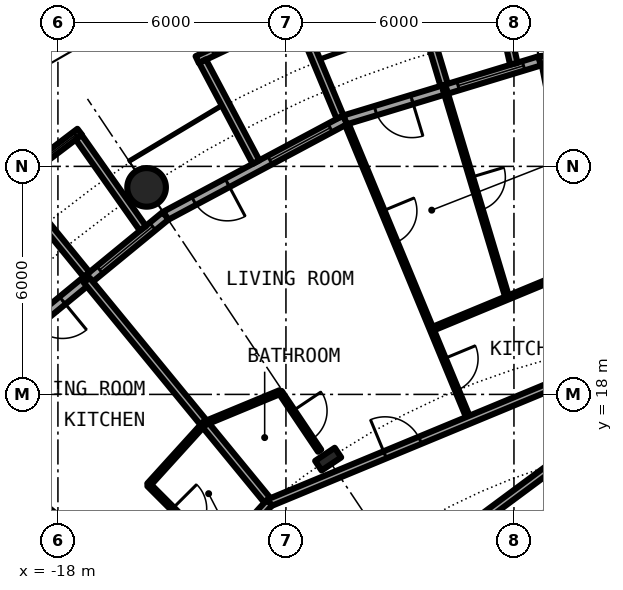
"""IFC4 building model, lengths in metres.
Left out: names, types, materials, properties, quantities, classifications, styles, units other than length and angle.
Written with IfcOpenShell. Run it as: python <this file> out.ifc"""

import sys

from ifc_helpers import new_model, si_unit, direction, frame, frame_2d, origin, origin_2d, place, context, subcontext, project, spatial, rectangle, circle, hollow_circle, i_section, extrude, element, fill, save


model = new_model("IFC4")
c1 = context("Model", 3, precision=1e-05, world=origin(), true_north=direction((0.0, 1.0)))
c2 = subcontext(c1, "Body", "Model", "MODEL_VIEW")
j1 = project(units=[si_unit("LENGTHUNIT", "METRE"), si_unit("PLANEANGLEUNIT", "RADIAN")], contexts=[c1])
p1 = place(None, origin())
s1 = spatial("IfcSite", under=j1, at=p1, CompositionType="ELEMENT")
p2 = place(p1, origin())
s2 = spatial("IfcBuilding", under=s1, at=p2, CompositionType="ELEMENT")
p3 = place(p2, frame((0.0, 0.0, 47.2)))
s3 = spatial("IfcBuildingStorey", under=s2, at=p3, CompositionType="ELEMENT", Elevation=47.2)
p4 = place(p3, frame((-15.667, 23.448, 0.0), z_axis=(0.0, 0.0, 1.0), x_axis=(1.0, 0.0, 0.0)))
e1 = element("IfcColumn", 1, at=p4, inside=s3, PredefinedType="COLUMN", context=c2, shape_type="SweptSolid", body=[
    extrude(hollow_circle(Radius=0.508, WallThickness=0.05, at=origin_2d()), origin(), (0.0, 0.0, 1.0), 3.05),
])
p5 = place(p3, frame((-10.889, 16.297, 0.0), z_axis=(0.0, 0.0, 1.0), x_axis=(-0.55557023302, 0.831469612303, 0.0)))
e2 = element("IfcColumn", 2, at=p5, inside=s3, PredefinedType="COLUMN", context=c2, shape_type="SweptSolid", body=[
    extrude(i_section(OverallWidth=0.305, OverallDepth=0.62, WebThickness=0.021, FlangeThickness=0.04, FilletRadius=0.027, at=origin_2d()), origin(), (0.0, 0.0, 1.0), 3.05),
])
p6 = place(p3, frame((0.0, 27.3, 0.0), z_axis=(0.0, 0.0, 1.0), x_axis=(-0.995173996315, -0.098126026407, 0.0)))
e3 = element("IfcWall", 3, at=p6, inside=s3, PredefinedType="SOLIDWALL", context=c2, shape_type="SweptSolid", body=[
    extrude(rectangle(XDim=5.352, YDim=0.25, at=frame_2d((2.676, 0.0))), origin(), (0.0, 0.0, 1.0), 2.7),
])
p7 = place(p6, frame((0.441, 0.0, 0.3)))
e4 = element("IfcOpeningElement", 4, at=p7, cuts=e3, PredefinedType="OPENING", context=c2, shape_type="SweptSolid", body=[
    extrude(rectangle(XDim=1.8, YDim=2.1, at=frame_2d((0.9, 1.05))), frame((0.0, 0.135, 0.0), z_axis=(0.0, -1.0, 0.0), x_axis=(1.0, 0.0, 0.0)), (0.0, 0.0, 1.0), 0.27),
])
p8 = place(p6, frame((3.51, 0.0, 0.0)))
e5 = element("IfcOpeningElement", 5, at=p8, cuts=e3, PredefinedType="OPENING", context=c2, shape_type="SweptSolid", body=[
    extrude(rectangle(XDim=1.0, YDim=2.2, at=frame_2d((0.5, 1.1))), frame((0.0, 0.135, 0.0), z_axis=(0.0, -1.0, 0.0), x_axis=(1.0, 0.0, 0.0)), (0.0, 0.0, 1.0), 0.27),
])
p9 = place(p3, frame((-5.326, 26.775, 0.0), z_axis=(0.0, 0.0, 1.0), x_axis=(-0.956965678721, -0.290201119486, 0.0)))
e6 = element("IfcWall", 6, at=p9, inside=s3, PredefinedType="SOLIDWALL", context=c2, shape_type="SweptSolid", body=[
    extrude(rectangle(XDim=5.351, YDim=0.25, at=frame_2d((2.676, 0.0))), origin(), (0.0, 0.0, 1.0), 2.7),
])
p10 = place(p9, frame((0.441, 0.0, 0.3)))
e7 = element("IfcOpeningElement", 7, at=p10, cuts=e6, PredefinedType="OPENING", context=c2, shape_type="SweptSolid", body=[
    extrude(rectangle(XDim=1.8, YDim=2.1, at=frame_2d((0.9, 1.05))), frame((0.0, 0.135, 0.0), z_axis=(0.0, -1.0, 0.0), x_axis=(1.0, 0.0, 0.0)), (0.0, 0.0, 1.0), 0.27),
])
p11 = place(p9, frame((3.51, 0.0, 0.0)))
e8 = element("IfcOpeningElement", 8, at=p11, cuts=e6, PredefinedType="OPENING", context=c2, shape_type="SweptSolid", body=[
    extrude(rectangle(XDim=1.0, YDim=2.2, at=frame_2d((0.5, 1.1))), frame((0.0, 0.135, 0.0), z_axis=(0.0, -1.0, 0.0), x_axis=(1.0, 0.0, 0.0)), (0.0, 0.0, 1.0), 0.27),
])
p12 = place(p3, frame((-6.004, 26.7, -0.03), z_axis=(0.0, 0.0, 1.0), x_axis=(-0.219609259383, 0.975587911566, 0.0)))
e9 = element("IfcWall", 9, at=p12, inside=s3, PredefinedType="SOLIDWALL", context=c2, shape_type="SweptSolid", body=[
    extrude(rectangle(XDim=2.933, YDim=0.2, at=frame_2d((1.466, 0.0))), origin(), (0.0, 0.0, 1.0), 2.73),
])
p13 = place(p3, frame((-7.837, 26.144, -0.03), z_axis=(0.0, 0.0, 1.0), x_axis=(-0.287064767992, 0.957911174889, 0.0)))
e10 = element("IfcWall", 10, at=p13, inside=s3, PredefinedType="SOLIDWALL", context=c2, shape_type="SweptSolid", body=[
    extrude(rectangle(XDim=3.006, YDim=0.2, at=frame_2d((1.503, 0.0))), origin(), (0.0, 0.0, 1.0), 2.73),
])
p14 = place(p3, frame((-10.447, 25.222, 0.0), z_axis=(0.0, 0.0, 1.0), x_axis=(-0.881915646801, -0.471407246368, 0.0)))
e11 = element("IfcWall", 11, at=p14, inside=s3, PredefinedType="SOLIDWALL", context=c2, shape_type="SweptSolid", body=[
    extrude(rectangle(XDim=5.352, YDim=0.25, at=frame_2d((2.676, 0.0))), origin(), (0.0, 0.0, 1.0), 2.7),
])
p15 = place(p14, frame((0.441, 0.0, 0.3)))
e12 = element("IfcOpeningElement", 12, at=p15, cuts=e11, PredefinedType="OPENING", context=c2, shape_type="SweptSolid", body=[
    extrude(rectangle(XDim=1.8, YDim=2.1, at=frame_2d((0.9, 1.05))), frame((0.0, 0.135, 0.0), z_axis=(0.0, -1.0, 0.0), x_axis=(1.0, 0.0, 0.0)), (0.0, 0.0, 1.0), 0.27),
])
p16 = place(p14, frame((3.51, 0.0, 0.0)))
e13 = element("IfcOpeningElement", 13, at=p16, cuts=e11, PredefinedType="OPENING", context=c2, shape_type="SweptSolid", body=[
    extrude(rectangle(XDim=1.0, YDim=2.2, at=frame_2d((0.5, 1.1))), frame((0.0, 0.135, 0.0), z_axis=(0.0, -1.0, 0.0), x_axis=(1.0, 0.0, 0.0)), (0.0, 0.0, 1.0), 0.27),
])
p17 = place(p3, frame((-11.629, 28.088, -0.03), z_axis=(0.0, 0.0, 1.0), x_axis=(-0.904000060331, -0.427532327342, 0.0)))
e14 = element("IfcWall", 14, at=p17, inside=s3, PredefinedType="SOLIDWALL", context=c2, shape_type="SweptSolid", body=[
    extrude(rectangle(XDim=2.993, YDim=0.2, at=frame_2d((1.497, 0.0))), origin(), (0.0, 0.0, 1.0), 2.73),
])
p18 = place(p17, frame((0.457, 0.0, 0.33)))
e15 = element("IfcOpeningElement", 15, at=p18, cuts=e14, PredefinedType="OPENING", context=c2, shape_type="SweptSolid", body=[
    extrude(circle(Radius=1.04, at=frame_2d((1.04, 1.04))), frame((0.0, 0.11, 0.0), z_axis=(0.0, -1.0, 0.0), x_axis=(1.0, 0.0, 0.0)), (0.0, 0.0, 1.0), 0.22),
])
p19 = place(p3, frame((-10.575, 25.295, -0.03), z_axis=(0.0, 0.0, 1.0), x_axis=(-0.385697364644, 0.922625353492, 0.0)))
e16 = element("IfcWall", 16, at=p19, inside=s3, PredefinedType="SOLIDWALL", context=c2, shape_type="SweptSolid", body=[
    extrude(rectangle(XDim=2.883, YDim=0.2, at=frame_2d((1.442, 0.0))), origin(), (0.0, 0.0, 1.0), 2.73),
])
p20 = place(p3, frame((-12.787, 24.113, -0.03), z_axis=(0.0, 0.0, 1.0), x_axis=(-0.468365282436, 0.883534924159, 0.0)))
e17 = element("IfcWall", 17, at=p20, inside=s3, PredefinedType="SOLIDWALL", context=c2, shape_type="SweptSolid", body=[
    extrude(rectangle(XDim=3.006, YDim=0.2, at=frame_2d((1.503, 0.0))), origin(), (0.0, 0.0, 1.0), 2.73),
])
p21 = place(p3, frame((-15.167, 22.699, 0.0), z_axis=(0.0, 0.0, 1.0), x_axis=(-0.773019449054, -0.634382322723, 0.0)))
e18 = element("IfcWall", 18, at=p21, inside=s3, PredefinedType="SOLIDWALL", context=c2, shape_type="SweptSolid", body=[
    extrude(rectangle(XDim=5.352, YDim=0.25, at=frame_2d((2.676, 0.0))), origin(), (0.0, 0.0, 1.0), 2.7),
])
p22 = place(p21, frame((0.441, 0.0, 0.3)))
e19 = element("IfcOpeningElement", 19, at=p22, cuts=e18, PredefinedType="OPENING", context=c2, shape_type="SweptSolid", body=[
    extrude(rectangle(XDim=1.8, YDim=2.1, at=frame_2d((0.9, 1.05))), frame((0.0, 0.135, 0.0), z_axis=(0.0, -1.0, 0.0), x_axis=(1.0, 0.0, 0.0)), (0.0, 0.0, 1.0), 0.27),
])
p23 = place(p21, frame((3.51, 0.0, 0.0)))
e20 = element("IfcOpeningElement", 20, at=p23, cuts=e18, PredefinedType="OPENING", context=c2, shape_type="SweptSolid", body=[
    extrude(rectangle(XDim=1.0, YDim=2.2, at=frame_2d((0.5, 1.1))), frame((0.0, 0.135, 0.0), z_axis=(0.0, -1.0, 0.0), x_axis=(1.0, 0.0, 0.0)), (0.0, 0.0, 1.0), 0.27),
])
p24 = place(p3, frame((-17.427, 24.909, -0.03), z_axis=(0.0, 0.0, 1.0), x_axis=(-0.796842165306, -0.60418752353, 0.0)))
e21 = element("IfcWall", 21, at=p24, inside=s3, PredefinedType="SOLIDWALL", context=c2, shape_type="SweptSolid", body=[
    extrude(rectangle(XDim=2.337, YDim=0.2, at=frame_2d((1.168, 0.0))), origin(), (0.0, 0.0, 1.0), 2.73),
])
p25 = place(p24, frame((0.128, 0.0, 0.33)))
e22 = element("IfcOpeningElement", 22, at=p25, cuts=e21, PredefinedType="OPENING", context=c2, shape_type="SweptSolid", body=[
    extrude(circle(Radius=1.04, at=frame_2d((1.04, 1.04))), frame((0.0, 0.11, 0.0), z_axis=(0.0, -1.0, 0.0), x_axis=(1.0, 0.0, 0.0)), (0.0, 0.0, 1.0), 0.22),
])
p26 = place(p3, frame((-15.765, 22.37, -0.03), z_axis=(0.0, 0.0, 1.0), x_axis=(-0.576274612209, 0.817256123454, 0.0)))
e23 = element("IfcWall", 23, at=p26, inside=s3, PredefinedType="SOLIDWALL", context=c2, shape_type="SweptSolid", body=[
    extrude(rectangle(XDim=2.933, YDim=0.2, at=frame_2d((1.466, 0.0))), origin(), (0.0, 0.0, 1.0), 2.73),
])
p27 = place(p3, frame((-17.246, 21.155, -0.03), z_axis=(0.0, 0.0, 1.0), x_axis=(-0.631741648902, 0.775179004516, 0.0)))
e24 = element("IfcWall", 24, at=p27, inside=s3, PredefinedType="SOLIDWALL", context=c2, shape_type="SweptSolid", body=[
    extrude(rectangle(XDim=3.006, YDim=0.2, at=frame_2d((1.503, 0.0))), origin(), (0.0, 0.0, 1.0), 2.73),
])
p28 = place(p3, frame((-10.398, 25.107, 0.0), z_axis=(0.0, 0.0, 1.0), x_axis=(0.382458509789, -0.923972666419, 0.0)))
e25 = element("IfcWall", 25, at=p28, inside=s3, PredefinedType="PARTITIONING", context=c2, shape_type="SweptSolid", body=[
    extrude(rectangle(XDim=8.419, YDim=0.1, at=frame_2d((4.209, 0.0))), origin(), (0.0, 0.0, 1.0), 2.7),
])
p29 = place(p28, frame((6.677, 0.0, 0.0)))
e26 = element("IfcOpeningElement", 26, at=p29, cuts=e25, PredefinedType="OPENING", context=c2, shape_type="SweptSolid", body=[
    extrude(rectangle(XDim=0.9, YDim=2.3, at=frame_2d((0.45, 1.15))), frame((0.0, 0.06, 0.0), z_axis=(0.0, -1.0, 0.0), x_axis=(1.0, 0.0, 0.0)), (0.0, 0.0, 1.0), 0.12),
])
p30 = place(p28, frame((2.468, 0.0, 0.0)))
e27 = element("IfcOpeningElement", 27, at=p30, cuts=e25, PredefinedType="OPENING", context=c2, shape_type="SweptSolid", body=[
    extrude(rectangle(XDim=0.9, YDim=2.3, at=frame_2d((0.45, 1.15))), frame((0.0, 0.06, 0.0), z_axis=(0.0, -1.0, 0.0), x_axis=(1.0, 0.0, 0.0)), (0.0, 0.0, 1.0), 0.12),
])
p31 = place(p3, frame((-22.596, 15.097, 0.0), z_axis=(0.0, 0.0, 1.0), x_axis=(0.831507055747, -0.555514190857, 0.0)))
e28 = element("IfcWall", 28, at=p31, inside=s3, PredefinedType="PARTITIONING", context=c2, shape_type="SweptSolid", body=[
    extrude(rectangle(XDim=7.265, YDim=0.2, at=frame_2d((3.633, 0.0))), origin(), (0.0, 0.0, 1.0), 2.7),
])
p32 = place(p3, frame((-21.014, 17.231, 0.0), z_axis=(0.0, 0.0, 1.0), x_axis=(0.773219330916, -0.634138680651, 0.0)))
e29 = element("IfcWall", 29, at=p32, inside=s3, PredefinedType="PARTITIONING", context=c2, shape_type="SweptSolid", body=[
    extrude(rectangle(XDim=5.089, YDim=0.1, at=frame_2d((2.544, 0.0))), origin(), (0.0, 0.0, 1.0), 2.7),
])
p33 = place(p32, frame((2.095, 0.0, 0.0)))
e30 = element("IfcOpeningElement", 30, at=p33, cuts=e29, PredefinedType="OPENING", context=c2, shape_type="SweptSolid", body=[
    extrude(rectangle(XDim=0.9, YDim=2.3, at=frame_2d((0.45, 1.15))), frame((0.0, 0.06, 0.0), z_axis=(0.0, -1.0, 0.0), x_axis=(1.0, 0.0, 0.0)), (0.0, 0.0, 1.0), 0.12),
])
p34 = place(p3, frame((-17.243, 21.005, 0.0), z_axis=(0.0, 0.0, 1.0), x_axis=(0.63447412651, -0.772944100689, 0.0)))
e31 = element("IfcWall", 31, at=p34, inside=s3, PredefinedType="PARTITIONING", context=c2, shape_type="SweptSolid", body=[
    extrude(rectangle(XDim=7.576, YDim=0.2, at=frame_2d((3.788, 0.0))), origin(), (0.0, 0.0, 1.0), 2.7),
])
p35 = place(p3, frame((-15.612, 15.622, 0.0), z_axis=(0.0, 0.0, 1.0), x_axis=(0.706741540154, -0.707471833659, 0.0)))
e32 = element("IfcWall", 32, at=p35, inside=s3, PredefinedType="PARTITIONING", context=c2, shape_type="SweptSolid", body=[
    extrude(rectangle(XDim=2.674, YDim=0.1, at=frame_2d((1.337, 0.0))), origin(), (0.0, 0.0, 1.0), 2.7),
])
p36 = place(p35, frame((0.887, 0.0, 0.0)))
e33 = element("IfcOpeningElement", 33, at=p36, cuts=e32, PredefinedType="OPENING", context=c2, shape_type="SweptSolid", body=[
    extrude(rectangle(XDim=0.9, YDim=2.3, at=frame_2d((0.45, 1.15))), frame((0.0, 0.06, 0.0), z_axis=(0.0, -1.0, 0.0), x_axis=(1.0, 0.0, 0.0)), (0.0, 0.0, 1.0), 0.12),
])
p37 = place(p3, frame((-12.153, 18.064, 0.0), z_axis=(0.0, 0.0, 1.0), x_axis=(0.558084773293, -0.829783939239, 0.0)))
e34 = element("IfcWall", 34, at=p37, inside=s3, PredefinedType="PARTITIONING", context=c2, shape_type="SweptSolid", body=[
    extrude(rectangle(XDim=1.862, YDim=0.1, at=frame_2d((0.931, 0.0))), origin(), (0.0, 0.0, 1.0), 2.7),
])
p38 = place(p37, frame((0.6, 0.0, 0.0)))
e35 = element("IfcOpeningElement", 35, at=p38, cuts=e34, PredefinedType="OPENING", context=c2, shape_type="SweptSolid", body=[
    extrude(rectangle(XDim=0.9, YDim=2.3, at=frame_2d((0.45, 1.15))), frame((0.0, 0.06, 0.0), z_axis=(0.0, -1.0, 0.0), x_axis=(1.0, 0.0, 0.0)), (0.0, 0.0, 1.0), 0.12),
])
p39 = place(p3, frame((-7.821, 26.025, 0.0), z_axis=(0.0, 0.0, 1.0), x_axis=(0.287793773423, -0.957692405723, 0.0)))
e36 = element("IfcWall", 36, at=p39, inside=s3, PredefinedType="PARTITIONING", context=c2, shape_type="SweptSolid", body=[
    extrude(rectangle(XDim=5.726, YDim=0.1, at=frame_2d((2.863, 0.0))), origin(), (0.0, 0.0, 1.0), 2.7),
])
p40 = place(p39, frame((2.413, 0.0, 0.0)))
e37 = element("IfcOpeningElement", 37, at=p40, cuts=e36, PredefinedType="OPENING", context=c2, shape_type="SweptSolid", body=[
    extrude(rectangle(XDim=0.9, YDim=2.3, at=frame_2d((0.45, 1.15))), frame((0.0, 0.06, 0.0), z_axis=(0.0, -1.0, 0.0), x_axis=(1.0, 0.0, 0.0)), (0.0, 0.0, 1.0), 0.12),
])
p41 = place(p3, frame((-5.217, 26.67, 0.0), z_axis=(0.0, 0.0, 1.0), x_axis=(0.192109041462, -0.981373586453, 0.0)))
e38 = element("IfcWall", 38, at=p41, inside=s3, PredefinedType="PARTITIONING", context=c2, shape_type="SweptSolid", body=[
    extrude(rectangle(XDim=5.404, YDim=0.1, at=frame_2d((2.702, 0.0))), origin(), (0.0, 0.0, 1.0), 2.7),
])
p42 = place(p41, frame((2.252, 0.0, 0.0)))
e39 = element("IfcOpeningElement", 39, at=p42, cuts=e38, PredefinedType="OPENING", context=c2, shape_type="SweptSolid", body=[
    extrude(rectangle(XDim=0.9, YDim=2.3, at=frame_2d((0.45, 1.15))), frame((0.0, 0.06, 0.0), z_axis=(0.0, -1.0, 0.0), x_axis=(1.0, 0.0, 0.0)), (0.0, 0.0, 1.0), 0.12),
])
p43 = place(p3, frame((-14.037, 9.4, 0.0), z_axis=(0.0, 0.0, 1.0), x_axis=(0.803202106898, 0.595706618626, 0.0)))
e40 = element("IfcWall", 40, at=p43, inside=s3, PredefinedType="PARTITIONING", context=c2, shape_type="SweptSolid", body=[
    extrude(rectangle(XDim=11.368, YDim=0.2, at=frame_2d((5.684, 0.0))), origin(), (0.0, 0.0, 1.0), 2.7),
])
p44 = place(p43, frame((5.988, 0.0, 0.0)))
e41 = element("IfcOpeningElement", 41, at=p44, cuts=e40, PredefinedType="OPENING", context=c2, shape_type="SweptSolid", body=[
    extrude(rectangle(XDim=1.0, YDim=2.3, at=frame_2d((0.5, 1.15))), frame((0.0, 0.11, 0.0), z_axis=(0.0, -1.0, 0.0), x_axis=(1.0, 0.0, 0.0)), (0.0, 0.0, 1.0), 0.22),
])
p45 = place(p3, frame((-12.435, 15.15, 0.0), z_axis=(0.0, 0.0, 1.0), x_axis=(0.923845560554, 0.38276543763, 0.0)))
e42 = element("IfcWall", 42, at=p45, inside=s3, PredefinedType="PARTITIONING", context=c2, shape_type="SweptSolid", body=[
    extrude(rectangle(XDim=11.381, YDim=0.2, at=frame_2d((5.69, 0.0))), origin(), (0.0, 0.0, 1.0), 2.7),
])
p46 = place(p45, frame((3.293, 0.0, 0.0)))
e43 = element("IfcOpeningElement", 43, at=p46, cuts=e42, PredefinedType="OPENING", context=c2, shape_type="SweptSolid", body=[
    extrude(rectangle(XDim=1.0, YDim=2.3, at=frame_2d((0.5, 1.15))), frame((0.0, 0.11, 0.0), z_axis=(0.0, -1.0, 0.0), x_axis=(1.0, 0.0, 0.0)), (0.0, 0.0, 1.0), 0.22),
])
p47 = place(p3, frame((-16.193, 11.003, 0.0), z_axis=(0.0, 0.0, 1.0), x_axis=(0.671514934772, 0.740991020444, 0.0)))
e44 = element("IfcWall", 44, at=p47, inside=s3, PredefinedType="PARTITIONING", context=c2, shape_type="SweptSolid", body=[
    extrude(rectangle(XDim=5.598, YDim=0.2, at=frame_2d((2.799, 0.0))), origin(), (0.0, 0.0, 1.0), 2.38),
])
p48 = place(p47, frame((1.293, 0.0, 0.0)))
e45 = element("IfcOpeningElement", 45, at=p48, cuts=e44, PredefinedType="OPENING", context=c2, shape_type="SweptSolid", body=[
    extrude(rectangle(XDim=1.0, YDim=2.3, at=frame_2d((0.5, 1.15))), frame((0.0, 0.11, 0.0), z_axis=(0.0, -1.0, 0.0), x_axis=(1.0, 0.0, 0.0)), (0.0, 0.0, 1.0), 0.22),
])
p49 = place(p3, frame((-14.149, 17.236, 0.0), z_axis=(0.0, 0.0, 1.0), x_axis=(0.923874819588, 0.382694810171, 0.0)))
e46 = element("IfcWall", 46, at=p49, inside=s3, PredefinedType="PARTITIONING", context=c2, shape_type="SweptSolid", body=[
    extrude(rectangle(XDim=2.158, YDim=0.1, at=frame_2d((1.079, 0.0))), origin(), (0.0, 0.0, 1.0), 2.7),
])
p50 = place(p3, frame((-8.166, 19.715, 0.0), z_axis=(0.0, 0.0, 1.0), x_axis=(0.923844914631, 0.382766996632, 0.0)))
e47 = element("IfcWall", 47, at=p50, inside=s3, PredefinedType="PARTITIONING", context=c2, shape_type="SweptSolid", body=[
    extrude(rectangle(XDim=6.474, YDim=0.1, at=frame_2d((3.237, 0.0))), origin(), (0.0, 0.0, 1.0), 2.7),
])
p51 = place(p3, frame((-15.613, 15.621, 0.0), z_axis=(0.0, 0.0, 1.0), x_axis=(0.67169789574, 0.740825172937, 0.0)))
e48 = element("IfcWall", 48, at=p51, inside=s3, PredefinedType="PARTITIONING", context=c2, shape_type="SweptSolid", body=[
    extrude(rectangle(XDim=2.183, YDim=0.1, at=frame_2d((1.091, 0.0))), origin(), (0.0, 0.0, 1.0), 2.7),
])
p52 = place(p10, origin())
e49 = element("IfcWindow", 49, at=p52, inside=s3, PartitioningType="SINGLE_PANEL", PredefinedType="WINDOW", context=c2, shape_type="SweptSolid", body=[
    extrude(rectangle(XDim=1.8, YDim=2.1, at=frame_2d((0.9, 1.05))), frame((0.0, 0.03, 0.0), z_axis=(0.0, -1.0, 0.0), x_axis=(1.0, 0.0, 0.0)), (0.0, 0.0, 1.0), 0.06),
])
fill(e7, e49)
p53 = place(p11, origin())
e50 = element("IfcDoor", 50, at=p53, inside=s3, OperationType="SINGLE_SWING_LEFT", PredefinedType="DOOR", context=c2, shape_type="SweptSolid", body=[
    extrude(rectangle(XDim=1.0, YDim=2.2, at=frame_2d((0.5, 1.1))), frame((0.0, 0.025, 0.0), z_axis=(0.0, -1.0, 0.0), x_axis=(1.0, 0.0, 0.0)), (0.0, 0.0, 1.0), 0.05),
])
fill(e8, e50)
p54 = place(p15, origin())
e51 = element("IfcWindow", 51, at=p54, inside=s3, PartitioningType="SINGLE_PANEL", PredefinedType="WINDOW", context=c2, shape_type="SweptSolid", body=[
    extrude(rectangle(XDim=1.8, YDim=2.1, at=frame_2d((0.9, 1.05))), frame((0.0, 0.03, 0.0), z_axis=(0.0, -1.0, 0.0), x_axis=(1.0, 0.0, 0.0)), (0.0, 0.0, 1.0), 0.06),
])
fill(e12, e51)
p55 = place(p18, origin())
e52 = element("IfcWindow", 52, at=p55, inside=s3, PartitioningType="SINGLE_PANEL", PredefinedType="WINDOW", context=c2, shape_type="SweptSolid", body=[
    extrude(circle(Radius=1.04, at=frame_2d((1.04, 1.04))), frame((0.0, 0.03, 0.0), z_axis=(0.0, -1.0, 0.0), x_axis=(1.0, 0.0, 0.0)), (0.0, 0.0, 1.0), 0.06),
])
fill(e15, e52)
p56 = place(p16, origin())
e53 = element("IfcDoor", 53, at=p56, inside=s3, OperationType="SINGLE_SWING_LEFT", PredefinedType="DOOR", context=c2, shape_type="SweptSolid", body=[
    extrude(rectangle(XDim=1.0, YDim=2.2, at=frame_2d((0.5, 1.1))), frame((0.0, 0.025, 0.0), z_axis=(0.0, -1.0, 0.0), x_axis=(1.0, 0.0, 0.0)), (0.0, 0.0, 1.0), 0.05),
])
fill(e13, e53)
p57 = place(p22, origin())
e54 = element("IfcWindow", 54, at=p57, inside=s3, PartitioningType="SINGLE_PANEL", PredefinedType="WINDOW", context=c2, shape_type="SweptSolid", body=[
    extrude(rectangle(XDim=1.8, YDim=2.1, at=frame_2d((0.9, 1.05))), frame((0.0, 0.03, 0.0), z_axis=(0.0, -1.0, 0.0), x_axis=(1.0, 0.0, 0.0)), (0.0, 0.0, 1.0), 0.06),
])
fill(e19, e54)
p58 = place(p25, origin())
e55 = element("IfcWindow", 55, at=p58, inside=s3, PartitioningType="SINGLE_PANEL", PredefinedType="WINDOW", context=c2, shape_type="SweptSolid", body=[
    extrude(circle(Radius=1.04, at=frame_2d((1.04, 1.04))), frame((0.0, 0.03, 0.0), z_axis=(0.0, -1.0, 0.0), x_axis=(1.0, 0.0, 0.0)), (0.0, 0.0, 1.0), 0.06),
])
fill(e22, e55)
p59 = place(p23, origin())
e56 = element("IfcDoor", 56, at=p59, inside=s3, OperationType="SINGLE_SWING_LEFT", PredefinedType="DOOR", context=c2, shape_type="SweptSolid", body=[
    extrude(rectangle(XDim=1.0, YDim=2.2, at=frame_2d((0.5, 1.1))), frame((0.0, 0.025, 0.0), z_axis=(0.0, -1.0, 0.0), x_axis=(1.0, 0.0, 0.0)), (0.0, 0.0, 1.0), 0.05),
])
fill(e20, e56)
p60 = place(p46, origin())
e57 = element("IfcDoor", 57, at=p60, inside=s3, OperationType="SINGLE_SWING_LEFT", PredefinedType="DOOR", context=c2, shape_type="SweptSolid", body=[
    extrude(rectangle(XDim=1.0, YDim=2.3, at=frame_2d((0.5, 1.15))), frame((0.0, 0.025, 0.0), z_axis=(0.0, -1.0, 0.0), x_axis=(1.0, 0.0, 0.0)), (0.0, 0.0, 1.0), 0.05),
])
fill(e43, e57)
p61 = place(p38, origin())
e58 = element("IfcDoor", 58, at=p61, inside=s3, OperationType="SINGLE_SWING_RIGHT", PredefinedType="DOOR", context=c2, shape_type="SweptSolid", body=[
    extrude(rectangle(XDim=0.9, YDim=2.3, at=frame_2d((0.45, 1.15))), frame((0.0, 0.025, 0.0), z_axis=(0.0, -1.0, 0.0), x_axis=(1.0, 0.0, 0.0)), (0.0, 0.0, 1.0), 0.05),
])
fill(e35, e58)
p62 = place(p29, origin())
e59 = element("IfcDoor", 59, at=p62, inside=s3, OperationType="SINGLE_SWING_RIGHT", PredefinedType="DOOR", context=c2, shape_type="SweptSolid", body=[
    extrude(rectangle(XDim=0.9, YDim=2.3, at=frame_2d((0.45, 1.15))), frame((0.0, 0.025, 0.0), z_axis=(0.0, -1.0, 0.0), x_axis=(1.0, 0.0, 0.0)), (0.0, 0.0, 1.0), 0.05),
])
fill(e26, e59)
p63 = place(p30, origin())
e60 = element("IfcDoor", 60, at=p63, inside=s3, OperationType="SINGLE_SWING_LEFT", PredefinedType="DOOR", context=c2, shape_type="SweptSolid", body=[
    extrude(rectangle(XDim=0.9, YDim=2.3, at=frame_2d((0.45, 1.15))), frame((0.0, 0.025, 0.0), z_axis=(0.0, -1.0, 0.0), x_axis=(1.0, 0.0, 0.0)), (0.0, 0.0, 1.0), 0.05),
])
fill(e27, e60)
p64 = place(p40, origin())
e61 = element("IfcDoor", 61, at=p64, inside=s3, OperationType="SINGLE_SWING_LEFT", PredefinedType="DOOR", context=c2, shape_type="SweptSolid", body=[
    extrude(rectangle(XDim=0.9, YDim=2.3, at=frame_2d((0.45, 1.15))), frame((0.0, 0.025, 0.0), z_axis=(0.0, -1.0, 0.0), x_axis=(1.0, 0.0, 0.0)), (0.0, 0.0, 1.0), 0.05),
])
fill(e37, e61)
p65 = place(p36, origin())
e62 = element("IfcDoor", 62, at=p65, inside=s3, OperationType="SINGLE_SWING_RIGHT", PredefinedType="DOOR", context=c2, shape_type="SweptSolid", body=[
    extrude(rectangle(XDim=0.9, YDim=2.3, at=frame_2d((0.45, 1.15))), frame((0.0, 0.025, 0.0), z_axis=(0.0, -1.0, 0.0), x_axis=(1.0, 0.0, 0.0)), (0.0, 0.0, 1.0), 0.05),
])
fill(e33, e62)
save(model, sys.argv[1])
